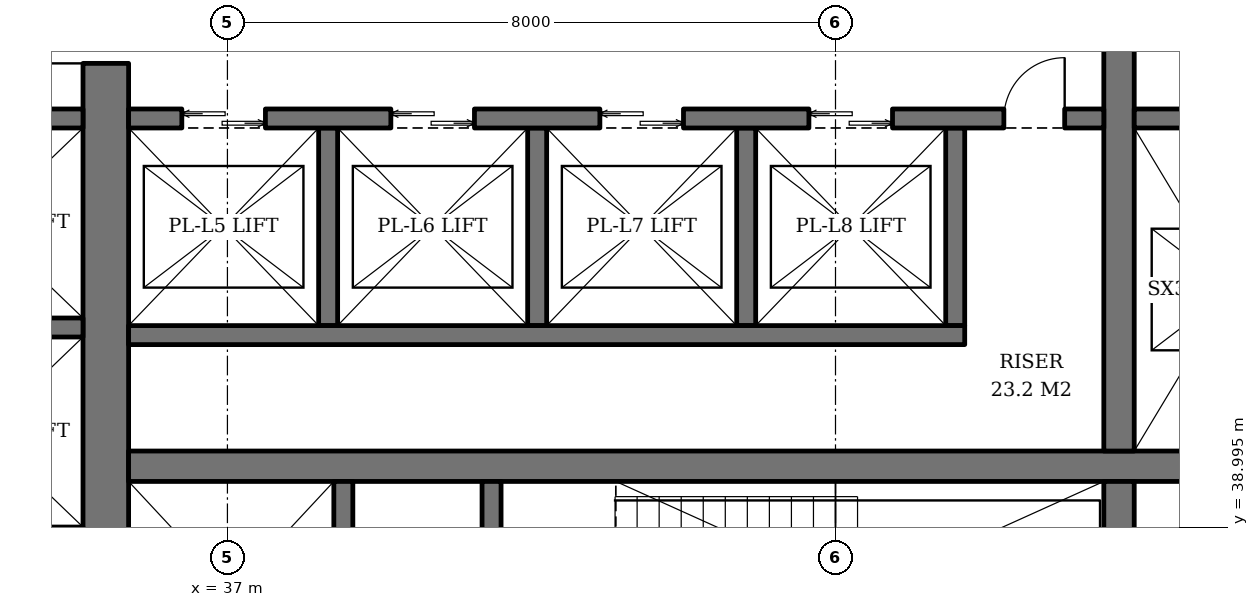
"""IFC4 building model, lengths in metres.
Left out: names, types, materials, properties, quantities, classifications, styles, units other than length and angle.
Written with IfcOpenShell. Run it as: python <this file> out.ifc"""

import sys

from ifc_helpers import new_model, si_unit, direction, frame, frame_2d, origin, place, context, subcontext, project, spatial, rectangle, extrude, element, fill, save


model = new_model("IFC4")
c1 = context("Model", 3, precision=1e-05, world=origin(), true_north=direction((0.0, 1.0)))
c2 = subcontext(c1, "Body", "Model", "MODEL_VIEW")
j1 = project(units=[si_unit("LENGTHUNIT", "METRE"), si_unit("PLANEANGLEUNIT", "RADIAN")], contexts=[c1])
p1 = place(None, origin())
s1 = spatial("IfcSite", under=j1, at=p1, CompositionType="ELEMENT")
p2 = place(p1, origin())
s2 = spatial("IfcBuilding", under=s1, at=p2, CompositionType="ELEMENT")
p3 = place(p2, frame((0.0, 0.0, 78.0)))
s3 = spatial("IfcBuildingStorey", under=s2, at=p3, CompositionType="ELEMENT", Elevation=78.0)
p4 = place(p3, frame((35.4, 36.7, 0.0), z_axis=(0.0, 0.0, 1.0), x_axis=(0.0, 1.0, 0.0)))
e1 = element("IfcWall", 1, at=p4, inside=s3, PredefinedType="SHEAR", context=c2, shape_type="SweptSolid", body=[
    extrude(rectangle(XDim=18.6, YDim=0.6, at=frame_2d((9.3, 0.0))), origin(), (0.0, 0.0, 1.0), 3.8),
])
p5 = place(p4, frame((8.4, 0.0, 0.0)))
e2 = element("IfcOpeningElement", 2, at=p5, cuts=e1, PredefinedType="OPENING", context=c2, shape_type="SweptSolid", body=[
    extrude(rectangle(XDim=1.8, YDim=2.4, at=frame_2d((0.9, 1.2))), frame((0.0, 0.31, 0.0), z_axis=(0.0, -1.0, 0.0), x_axis=(1.0, 0.0, 0.0)), (0.0, 0.0, 1.0), 0.62),
])
p6 = place(p3, frame((35.7, 39.8, 0.0), z_axis=(0.0, 0.0, 1.0), x_axis=(1.0, 0.0, 0.0)))
e3 = element("IfcWall", 3, at=p6, inside=s3, PredefinedType="SHEAR", context=c2, shape_type="SweptSolid", body=[
    extrude(rectangle(XDim=18.6, YDim=0.4, at=frame_2d((9.3, 0.0))), origin(), (0.0, 0.0, 1.0), 3.8),
])
p7 = place(p3, frame((48.73, 36.7, 0.0), z_axis=(0.0, 0.0, 1.0), x_axis=(0.0, 1.0, 0.0)))
e4 = element("IfcWall", 4, at=p7, inside=s3, PredefinedType="SHEAR", context=c2, shape_type="SweptSolid", body=[
    extrude(rectangle(XDim=2.9, YDim=0.4, at=frame_2d((1.45, 0.0))), origin(), (0.0, 0.0, 1.0), 3.8),
])
p8 = place(p3, frame((48.73, 40.0, 0.0), z_axis=(0.0, 0.0, 1.0), x_axis=(0.0, 1.0, 0.0)))
e5 = element("IfcWall", 5, at=p8, inside=s3, PredefinedType="SHEAR", context=c2, shape_type="SweptSolid", body=[
    extrude(rectangle(XDim=12.0, YDim=0.4, at=frame_2d((6.0, 0.0))), origin(), (0.0, 0.0, 1.0), 3.8),
])
p9 = place(p3, frame((38.525, 36.7, 0.0), z_axis=(0.0, 0.0, 1.0), x_axis=(0.0, 1.0, 0.0)))
e6 = element("IfcWall", 6, at=p9, inside=s3, PredefinedType="SHEAR", context=c2, shape_type="SweptSolid", body=[
    extrude(rectangle(XDim=2.9, YDim=0.25, at=frame_2d((1.45, 0.0))), origin(), (0.0, 0.0, 1.0), 3.8),
])
p10 = place(p9, frame((0.8, 0.0, 0.0)))
e7 = element("IfcOpeningElement", 7, at=p10, cuts=e6, PredefinedType="OPENING", context=c2, shape_type="SweptSolid", body=[
    extrude(rectangle(XDim=1.3, YDim=2.2, at=frame_2d((0.65, 1.1))), frame((0.0, 0.135, 0.0), z_axis=(0.0, -1.0, 0.0), x_axis=(1.0, 0.0, 0.0)), (0.0, 0.0, 1.0), 0.27),
])
p11 = place(p3, frame((40.475, 36.7, 0.0), z_axis=(0.0, 0.0, 1.0), x_axis=(0.0, 1.0, 0.0)))
e8 = element("IfcWall", 8, at=p11, inside=s3, PredefinedType="SHEAR", context=c2, shape_type="SweptSolid", body=[
    extrude(rectangle(XDim=2.9, YDim=0.25, at=frame_2d((1.45, 0.0))), origin(), (0.0, 0.0, 1.0), 3.8),
])
p12 = place(p11, frame((0.75, 0.0, 0.0)))
e9 = element("IfcOpeningElement", 9, at=p12, cuts=e8, PredefinedType="OPENING", context=c2, shape_type="SweptSolid", body=[
    extrude(rectangle(XDim=1.2, YDim=2.1, at=frame_2d((0.6, 1.05))), frame((0.0, 0.135, 0.0), z_axis=(0.0, -1.0, 0.0), x_axis=(1.0, 0.0, 0.0)), (0.0, 0.0, 1.0), 0.27),
])
for number, where, z_axis, x_axis in (
    (10, (38.325, 44.25, 0.0), (0.0, 0.0, 1.0), (0.0, -1.0, 0.0)),
    (11, (41.075, 44.25, 0.0), (0.0, 0.0, 1.0), (0.0, -1.0, 0.0)),
    (12, (43.825, 44.25, 0.0), (0.0, 0.0, 1.0), (0.0, -1.0, 0.0)),
    (13, (46.575, 44.25, 0.0), (0.0, 0.0, 1.0), (0.0, -1.0, 0.0)),
):
    element("IfcWall", number, at=place(p3, frame(where, z_axis=z_axis, x_axis=x_axis)), inside=s3, PredefinedType="SHEAR", context=c2, shape_type="SweptSolid", body=[
        extrude(rectangle(XDim=2.6, YDim=0.25, at=frame_2d((1.3, 0.0))), origin(), (0.0, 0.0, 1.0), 3.8),
    ])
p13 = place(p3, frame((35.7, 41.525, 0.0), z_axis=(0.0, 0.0, 1.0), x_axis=(1.0, 0.0, 0.0)))
e14 = element("IfcWall", 14, at=p13, inside=s3, PredefinedType="SHEAR", context=c2, shape_type="SweptSolid", body=[
    extrude(rectangle(XDim=11.0, YDim=0.25, at=frame_2d((5.5, 0.0))), origin(), (0.0, 0.0, 1.0), 3.8),
])
p14 = place(p3, frame((35.7, 44.375, 0.0), z_axis=(0.0, 0.0, 1.0), x_axis=(1.0, 0.0, 0.0)))
e15 = element("IfcWall", 15, at=p14, inside=s3, PredefinedType="SHEAR", context=c2, shape_type="SweptSolid", body=[
    extrude(rectangle(XDim=12.83, YDim=0.25, at=frame_2d((6.415, 0.0))), origin(), (0.0, 0.0, 1.0), 3.8),
])
p15 = place(p14, frame((0.7, 0.0, 0.0)))
e16 = element("IfcOpeningElement", 16, at=p15, cuts=e15, PredefinedType="OPENING", context=c2, shape_type="SweptSolid", body=[
    extrude(rectangle(XDim=1.1, YDim=2.2, at=frame_2d((0.55, 1.1))), frame((0.0, 0.135, 0.0), z_axis=(0.0, -1.0, 0.0), x_axis=(1.0, 0.0, 0.0)), (0.0, 0.0, 1.0), 0.27),
])
p16 = place(p14, frame((3.45, 0.0, 0.0)))
e17 = element("IfcOpeningElement", 17, at=p16, cuts=e15, PredefinedType="OPENING", context=c2, shape_type="SweptSolid", body=[
    extrude(rectangle(XDim=1.1, YDim=2.2, at=frame_2d((0.55, 1.1))), frame((0.0, 0.135, 0.0), z_axis=(0.0, -1.0, 0.0), x_axis=(1.0, 0.0, 0.0)), (0.0, 0.0, 1.0), 0.27),
])
p17 = place(p14, frame((6.2, 0.0, 0.0)))
e18 = element("IfcOpeningElement", 18, at=p17, cuts=e15, PredefinedType="OPENING", context=c2, shape_type="SweptSolid", body=[
    extrude(rectangle(XDim=1.1, YDim=2.2, at=frame_2d((0.55, 1.1))), frame((0.0, 0.135, 0.0), z_axis=(0.0, -1.0, 0.0), x_axis=(1.0, 0.0, 0.0)), (0.0, 0.0, 1.0), 0.27),
])
p18 = place(p14, frame((8.95, 0.0, 0.0)))
e19 = element("IfcOpeningElement", 19, at=p18, cuts=e15, PredefinedType="OPENING", context=c2, shape_type="SweptSolid", body=[
    extrude(rectangle(XDim=1.1, YDim=2.2, at=frame_2d((0.55, 1.1))), frame((0.0, 0.135, 0.0), z_axis=(0.0, -1.0, 0.0), x_axis=(1.0, 0.0, 0.0)), (0.0, 0.0, 1.0), 0.27),
])
p19 = place(p14, frame((11.515, 0.0, 0.0)))
e20 = element("IfcOpeningElement", 20, at=p19, cuts=e15, PredefinedType="OPENING", context=c2, shape_type="SweptSolid", body=[
    extrude(rectangle(XDim=0.8, YDim=2.0, at=frame_2d((0.4, 1.0))), frame((0.0, 0.135, 0.0), z_axis=(0.0, -1.0, 0.0), x_axis=(1.0, 0.0, 0.0)), (0.0, 0.0, 1.0), 0.27),
])
p20 = place(p3, frame((48.93, 44.375, 0.0), z_axis=(0.0, 0.0, 1.0), x_axis=(1.0, 0.0, 0.0)))
e21 = element("IfcWall", 21, at=p20, inside=s3, PredefinedType="SHEAR", context=c2, shape_type="SweptSolid", body=[
    extrude(rectangle(XDim=5.37, YDim=0.25, at=frame_2d((2.685, 0.0))), origin(), (0.0, 0.0, 1.0), 3.8),
])
for number, where, z_axis, x_axis in (
    (22, (32.5, 41.625, 0.0), (0.0, 0.0, 1.0), (1.0, 0.0, 0.0)),
    (23, (32.5, 44.375, 0.0), (0.0, 0.0, 1.0), (1.0, 0.0, 0.0)),
):
    element("IfcWall", number, at=place(p3, frame(where, z_axis=z_axis, x_axis=x_axis)), inside=s3, PredefinedType="SHEAR", context=c2, shape_type="SweptSolid", body=[
        extrude(rectangle(XDim=2.6, YDim=0.25, at=frame_2d((1.3, 0.0))), origin(), (0.0, 0.0, 1.0), 3.8),
    ])
p21 = place(p15, origin())
e24 = element("IfcDoor", 24, at=p21, inside=s3, OperationType="DOUBLE_DOOR_SLIDING", PredefinedType="DOOR", context=c2, shape_type="SweptSolid", body=[
    extrude(rectangle(XDim=1.1, YDim=2.2, at=frame_2d((0.55, 1.1))), frame((0.0, 0.025, 0.0), z_axis=(0.0, -1.0, 0.0), x_axis=(1.0, 0.0, 0.0)), (0.0, 0.0, 1.0), 0.05),
])
fill(e16, e24)
p22 = place(p16, origin())
e25 = element("IfcDoor", 25, at=p22, inside=s3, OperationType="DOUBLE_DOOR_SLIDING", PredefinedType="DOOR", context=c2, shape_type="SweptSolid", body=[
    extrude(rectangle(XDim=1.1, YDim=2.2, at=frame_2d((0.55, 1.1))), frame((0.0, 0.025, 0.0), z_axis=(0.0, -1.0, 0.0), x_axis=(1.0, 0.0, 0.0)), (0.0, 0.0, 1.0), 0.05),
])
fill(e17, e25)
p23 = place(p17, origin())
e26 = element("IfcDoor", 26, at=p23, inside=s3, OperationType="DOUBLE_DOOR_SLIDING", PredefinedType="DOOR", context=c2, shape_type="SweptSolid", body=[
    extrude(rectangle(XDim=1.1, YDim=2.2, at=frame_2d((0.55, 1.1))), frame((0.0, 0.025, 0.0), z_axis=(0.0, -1.0, 0.0), x_axis=(1.0, 0.0, 0.0)), (0.0, 0.0, 1.0), 0.05),
])
fill(e18, e26)
p24 = place(p18, origin())
e27 = element("IfcDoor", 27, at=p24, inside=s3, OperationType="DOUBLE_DOOR_SLIDING", PredefinedType="DOOR", context=c2, shape_type="SweptSolid", body=[
    extrude(rectangle(XDim=1.1, YDim=2.2, at=frame_2d((0.55, 1.1))), frame((0.0, 0.025, 0.0), z_axis=(0.0, -1.0, 0.0), x_axis=(1.0, 0.0, 0.0)), (0.0, 0.0, 1.0), 0.05),
])
fill(e19, e27)
p25 = place(p19, origin())
e28 = element("IfcDoor", 28, at=p25, inside=s3, OperationType="SINGLE_SWING_RIGHT", PredefinedType="DOOR", context=c2, shape_type="SweptSolid", body=[
    extrude(rectangle(XDim=0.8, YDim=2.0, at=frame_2d((0.4, 1.0))), frame((0.0, 0.025, 0.0), z_axis=(0.0, -1.0, 0.0), x_axis=(1.0, 0.0, 0.0)), (0.0, 0.0, 1.0), 0.05),
])
fill(e20, e28)
p26 = place(p5, origin())
e29 = element("IfcDoor", 29, at=p26, inside=s3, OperationType="DOUBLE_DOOR_SINGLE_SWING", PredefinedType="DOOR", context=c2, shape_type="SweptSolid", body=[
    extrude(rectangle(XDim=1.8, YDim=2.4, at=frame_2d((0.9, 1.2))), frame((0.0, 0.025, 0.0), z_axis=(0.0, -1.0, 0.0), x_axis=(1.0, 0.0, 0.0)), (0.0, 0.0, 1.0), 0.05),
])
fill(e2, e29)
save(model, sys.argv[1])
